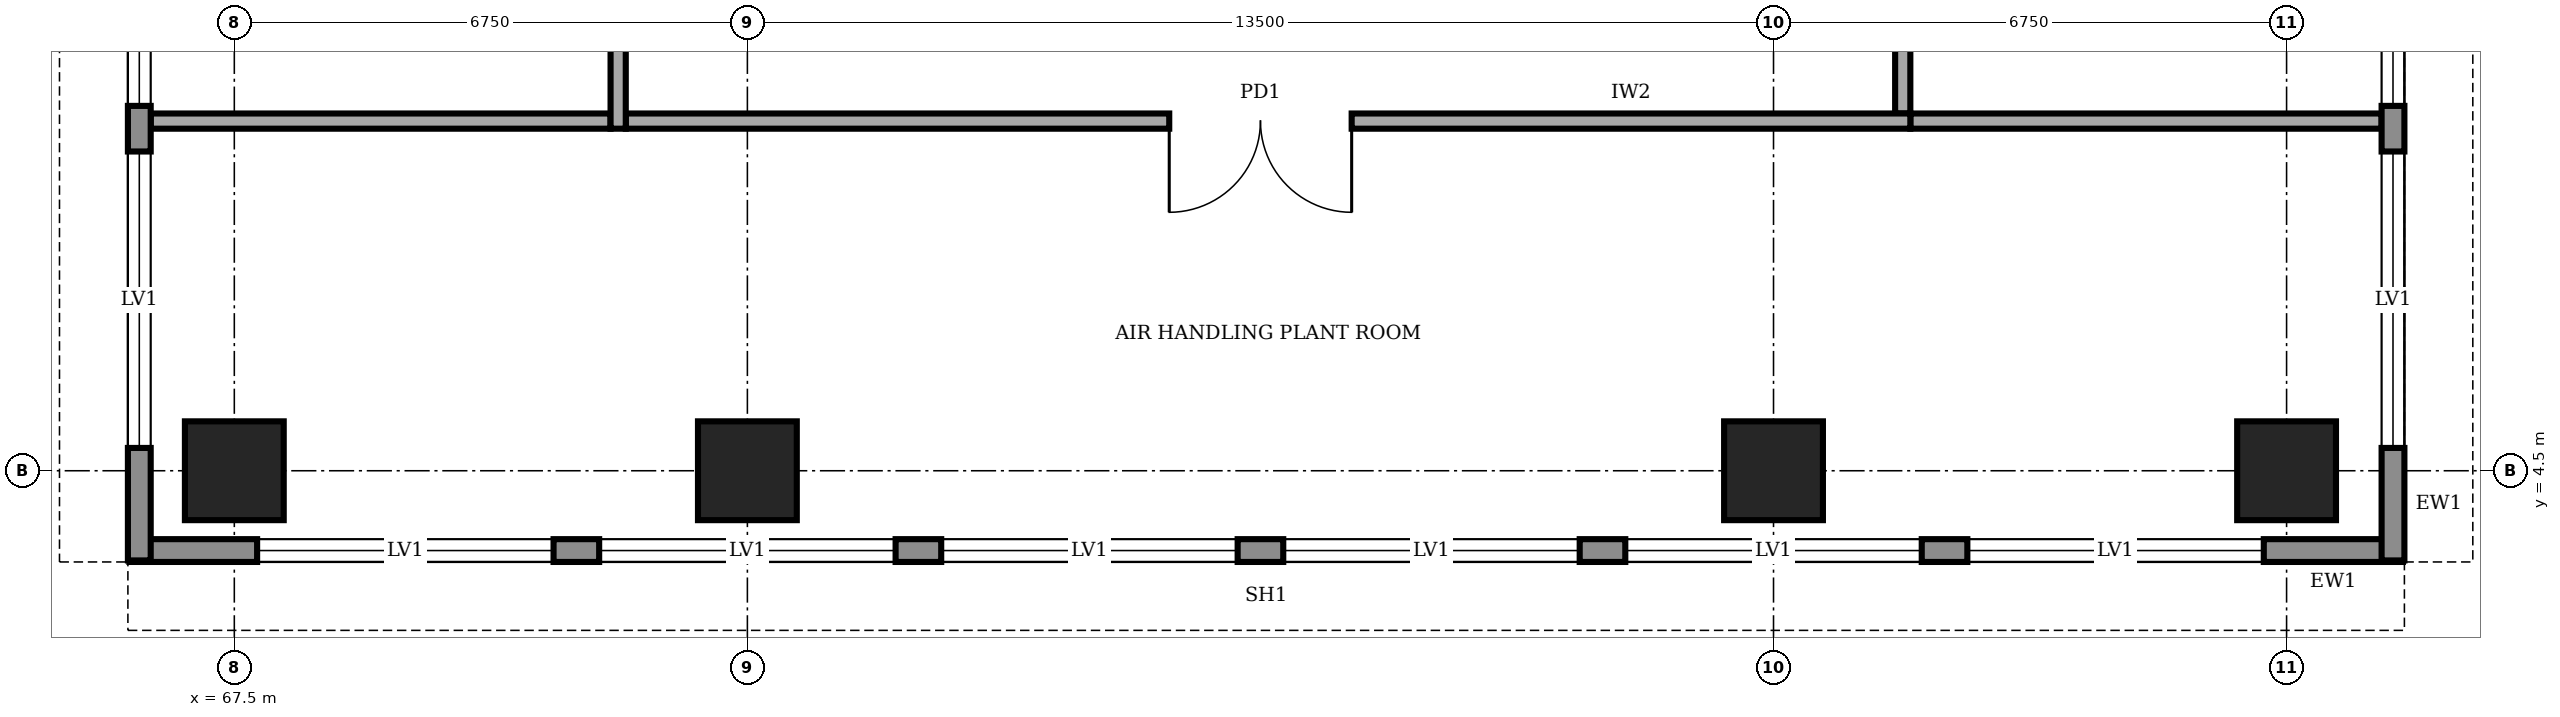
"""IFC4 building model, lengths in metres.
Left out: names, types, materials, properties, quantities, classifications, styles, units other than length and angle.
Written with IfcOpenShell. Run it as: python <this file> out.ifc"""

import sys

from ifc_helpers import new_model, si_unit, direction, frame, frame_2d, origin, origin_2d, place, context, subcontext, project, spatial, rectangle, extrude, element, fill, save


model = new_model("IFC4")
c1 = context("Model", 3, precision=1e-05, world=origin(), true_north=direction((0.0, 1.0)))
c2 = subcontext(c1, "Body", "Model", "MODEL_VIEW")
j1 = project(units=[si_unit("LENGTHUNIT", "METRE"), si_unit("PLANEANGLEUNIT", "RADIAN")], contexts=[c1])
p1 = place(None, origin())
s1 = spatial("IfcSite", under=j1, at=p1, CompositionType="ELEMENT")
p2 = place(p1, origin())
s2 = spatial("IfcBuilding", under=s1, at=p2, CompositionType="ELEMENT")
p3 = place(p2, frame((0.0, 0.0, 229.0)))
s3 = spatial("IfcBuildingStorey", under=s2, at=p3, CompositionType="ELEMENT", Elevation=229.0)
for number, where, z_axis, x_axis in (
    (1, (67.5, 4.5, 0.0), (0.0, 0.0, 1.0), (1.0, 0.0, 0.0)),
    (2, (74.25, 4.5, 0.0), (0.0, 0.0, 1.0), (1.0, 0.0, 0.0)),
    (3, (87.75, 4.5, 0.0), (0.0, 0.0, 1.0), (1.0, 0.0, 0.0)),
    (4, (94.5, 4.5, 0.0), (0.0, 0.0, 1.0), (1.0, 0.0, 0.0)),
):
    element("IfcColumn", number, at=place(p3, frame(where, z_axis=z_axis, x_axis=x_axis)), inside=s3, PredefinedType="COLUMN", context=c2, shape_type="SweptSolid", body=[
        extrude(rectangle(XDim=1.3, YDim=1.3, at=origin_2d()), origin(), (0.0, 0.0, 1.0), 4.0),
    ])
p4 = place(p3, frame((66.12, 3.45, 0.0), z_axis=(0.0, 0.0, 1.0), x_axis=(1.0, 0.0, 0.0)))
e5 = element("IfcWall", 5, at=p4, inside=s3, PredefinedType="STANDARD", context=c2, shape_type="SweptSolid", body=[
    extrude(rectangle(XDim=29.91, YDim=0.3, at=frame_2d((14.955, 0.0))), origin(), (0.0, 0.0, 1.0), 3.75),
])
p5 = place(p4, frame((1.68, 0.0, 0.9)))
e6 = element("IfcOpeningElement", 6, at=p5, cuts=e5, PredefinedType="OPENING", context=c2, shape_type="SweptSolid", body=[
    extrude(rectangle(XDim=3.9, YDim=2.2, at=frame_2d((1.95, 1.1))), frame((0.0, 0.16, 0.0), z_axis=(0.0, -1.0, 0.0), x_axis=(1.0, 0.0, 0.0)), (0.0, 0.0, 1.0), 0.32),
])
p6 = place(p4, frame((6.18, 0.0, 0.9)))
e7 = element("IfcOpeningElement", 7, at=p6, cuts=e5, PredefinedType="OPENING", context=c2, shape_type="SweptSolid", body=[
    extrude(rectangle(XDim=3.9, YDim=2.2, at=frame_2d((1.95, 1.1))), frame((0.0, 0.16, 0.0), z_axis=(0.0, -1.0, 0.0), x_axis=(1.0, 0.0, 0.0)), (0.0, 0.0, 1.0), 0.32),
])
p7 = place(p4, frame((10.68, 0.0, 0.9)))
e8 = element("IfcOpeningElement", 8, at=p7, cuts=e5, PredefinedType="OPENING", context=c2, shape_type="SweptSolid", body=[
    extrude(rectangle(XDim=3.9, YDim=2.2, at=frame_2d((1.95, 1.1))), frame((0.0, 0.16, 0.0), z_axis=(0.0, -1.0, 0.0), x_axis=(1.0, 0.0, 0.0)), (0.0, 0.0, 1.0), 0.32),
])
p8 = place(p4, frame((15.18, 0.0, 0.9)))
e9 = element("IfcOpeningElement", 9, at=p8, cuts=e5, PredefinedType="OPENING", context=c2, shape_type="SweptSolid", body=[
    extrude(rectangle(XDim=3.9, YDim=2.2, at=frame_2d((1.95, 1.1))), frame((0.0, 0.16, 0.0), z_axis=(0.0, -1.0, 0.0), x_axis=(1.0, 0.0, 0.0)), (0.0, 0.0, 1.0), 0.32),
])
p9 = place(p4, frame((19.68, 0.0, 0.9)))
e10 = element("IfcOpeningElement", 10, at=p9, cuts=e5, PredefinedType="OPENING", context=c2, shape_type="SweptSolid", body=[
    extrude(rectangle(XDim=3.9, YDim=2.2, at=frame_2d((1.95, 1.1))), frame((0.0, 0.16, 0.0), z_axis=(0.0, -1.0, 0.0), x_axis=(1.0, 0.0, 0.0)), (0.0, 0.0, 1.0), 0.32),
])
p10 = place(p4, frame((24.18, 0.0, 0.9)))
e11 = element("IfcOpeningElement", 11, at=p10, cuts=e5, PredefinedType="OPENING", context=c2, shape_type="SweptSolid", body=[
    extrude(rectangle(XDim=3.9, YDim=2.2, at=frame_2d((1.95, 1.1))), frame((0.0, 0.16, 0.0), z_axis=(0.0, -1.0, 0.0), x_axis=(1.0, 0.0, 0.0)), (0.0, 0.0, 1.0), 0.32),
])
p11 = place(p3, frame((95.9, 3.32, 0.0), z_axis=(0.0, 0.0, 1.0), x_axis=(0.0, 1.0, 0.0)))
e12 = element("IfcWall", 12, at=p11, inside=s3, PredefinedType="STANDARD", context=c2, shape_type="SweptSolid", body=[
    extrude(rectangle(XDim=33.86, YDim=0.3, at=frame_2d((16.93, 0.0))), origin(), (0.0, 0.0, 1.0), 3.75),
])
p12 = place(p11, frame((1.48, 0.0, 0.9)))
e13 = element("IfcOpeningElement", 13, at=p12, cuts=e12, PredefinedType="OPENING", context=c2, shape_type="SweptSolid", body=[
    extrude(rectangle(XDim=3.9, YDim=2.2, at=frame_2d((1.95, 1.1))), frame((0.0, 0.16, 0.0), z_axis=(0.0, -1.0, 0.0), x_axis=(1.0, 0.0, 0.0)), (0.0, 0.0, 1.0), 0.32),
])
p13 = place(p11, frame((5.98, 0.0, 0.9)))
e14 = element("IfcOpeningElement", 14, at=p13, cuts=e12, PredefinedType="OPENING", context=c2, shape_type="SweptSolid", body=[
    extrude(rectangle(XDim=3.9, YDim=2.2, at=frame_2d((1.95, 1.1))), frame((0.0, 0.16, 0.0), z_axis=(0.0, -1.0, 0.0), x_axis=(1.0, 0.0, 0.0)), (0.0, 0.0, 1.0), 0.32),
])
p14 = place(p11, frame((10.48, 0.0, 0.9)))
e15 = element("IfcOpeningElement", 15, at=p14, cuts=e12, PredefinedType="OPENING", context=c2, shape_type="SweptSolid", body=[
    extrude(rectangle(XDim=3.9, YDim=2.2, at=frame_2d((1.95, 1.1))), frame((0.0, 0.16, 0.0), z_axis=(0.0, -1.0, 0.0), x_axis=(1.0, 0.0, 0.0)), (0.0, 0.0, 1.0), 0.32),
])
p15 = place(p11, frame((14.98, 0.0, 0.9)))
e16 = element("IfcOpeningElement", 16, at=p15, cuts=e12, PredefinedType="OPENING", context=c2, shape_type="SweptSolid", body=[
    extrude(rectangle(XDim=3.9, YDim=2.2, at=frame_2d((1.95, 1.1))), frame((0.0, 0.16, 0.0), z_axis=(0.0, -1.0, 0.0), x_axis=(1.0, 0.0, 0.0)), (0.0, 0.0, 1.0), 0.32),
])
p16 = place(p11, frame((19.48, 0.0, 0.9)))
e17 = element("IfcOpeningElement", 17, at=p16, cuts=e12, PredefinedType="OPENING", context=c2, shape_type="SweptSolid", body=[
    extrude(rectangle(XDim=3.9, YDim=2.2, at=frame_2d((1.95, 1.1))), frame((0.0, 0.16, 0.0), z_axis=(0.0, -1.0, 0.0), x_axis=(1.0, 0.0, 0.0)), (0.0, 0.0, 1.0), 0.32),
])
p17 = place(p11, frame((23.98, 0.0, 0.9)))
e18 = element("IfcOpeningElement", 18, at=p17, cuts=e12, PredefinedType="OPENING", context=c2, shape_type="SweptSolid", body=[
    extrude(rectangle(XDim=3.9, YDim=2.2, at=frame_2d((1.95, 1.1))), frame((0.0, 0.16, 0.0), z_axis=(0.0, -1.0, 0.0), x_axis=(1.0, 0.0, 0.0)), (0.0, 0.0, 1.0), 0.32),
])
p18 = place(p11, frame((28.48, 0.0, 0.9)))
e19 = element("IfcOpeningElement", 19, at=p18, cuts=e12, PredefinedType="OPENING", context=c2, shape_type="SweptSolid", body=[
    extrude(rectangle(XDim=3.9, YDim=2.2, at=frame_2d((1.95, 1.1))), frame((0.0, 0.16, 0.0), z_axis=(0.0, -1.0, 0.0), x_axis=(1.0, 0.0, 0.0)), (0.0, 0.0, 1.0), 0.32),
])
p19 = place(p3, frame((66.25, 37.18, 0.0), z_axis=(0.0, 0.0, 1.0), x_axis=(0.0, -1.0, 0.0)))
e20 = element("IfcWall", 20, at=p19, inside=s3, PredefinedType="STANDARD", context=c2, shape_type="SweptSolid", body=[
    extrude(rectangle(XDim=33.86, YDim=0.3, at=frame_2d((16.93, 0.0))), origin(), (0.0, 0.0, 1.0), 3.75),
])
p20 = place(p19, frame((28.48, 0.0, 0.9)))
e21 = element("IfcOpeningElement", 21, at=p20, cuts=e20, PredefinedType="OPENING", context=c2, shape_type="SweptSolid", body=[
    extrude(rectangle(XDim=3.9, YDim=2.2, at=frame_2d((1.95, 1.1))), frame((0.0, 0.16, 0.0), z_axis=(0.0, -1.0, 0.0), x_axis=(1.0, 0.0, 0.0)), (0.0, 0.0, 1.0), 0.32),
])
p21 = place(p19, frame((23.98, 0.0, 0.9)))
e22 = element("IfcOpeningElement", 22, at=p21, cuts=e20, PredefinedType="OPENING", context=c2, shape_type="SweptSolid", body=[
    extrude(rectangle(XDim=3.9, YDim=2.2, at=frame_2d((1.95, 1.1))), frame((0.0, 0.16, 0.0), z_axis=(0.0, -1.0, 0.0), x_axis=(1.0, 0.0, 0.0)), (0.0, 0.0, 1.0), 0.32),
])
p22 = place(p19, frame((19.48, 0.0, 0.9)))
e23 = element("IfcOpeningElement", 23, at=p22, cuts=e20, PredefinedType="OPENING", context=c2, shape_type="SweptSolid", body=[
    extrude(rectangle(XDim=3.9, YDim=2.2, at=frame_2d((1.95, 1.1))), frame((0.0, 0.16, 0.0), z_axis=(0.0, -1.0, 0.0), x_axis=(1.0, 0.0, 0.0)), (0.0, 0.0, 1.0), 0.32),
])
p23 = place(p19, frame((14.98, 0.0, 0.9)))
e24 = element("IfcOpeningElement", 24, at=p23, cuts=e20, PredefinedType="OPENING", context=c2, shape_type="SweptSolid", body=[
    extrude(rectangle(XDim=3.9, YDim=2.2, at=frame_2d((1.95, 1.1))), frame((0.0, 0.16, 0.0), z_axis=(0.0, -1.0, 0.0), x_axis=(1.0, 0.0, 0.0)), (0.0, 0.0, 1.0), 0.32),
])
p24 = place(p19, frame((10.48, 0.0, 0.9)))
e25 = element("IfcOpeningElement", 25, at=p24, cuts=e20, PredefinedType="OPENING", context=c2, shape_type="SweptSolid", body=[
    extrude(rectangle(XDim=3.9, YDim=2.2, at=frame_2d((1.95, 1.1))), frame((0.0, 0.16, 0.0), z_axis=(0.0, -1.0, 0.0), x_axis=(1.0, 0.0, 0.0)), (0.0, 0.0, 1.0), 0.32),
])
p25 = place(p19, frame((5.98, 0.0, 0.9)))
e26 = element("IfcOpeningElement", 26, at=p25, cuts=e20, PredefinedType="OPENING", context=c2, shape_type="SweptSolid", body=[
    extrude(rectangle(XDim=3.9, YDim=2.2, at=frame_2d((1.95, 1.1))), frame((0.0, 0.16, 0.0), z_axis=(0.0, -1.0, 0.0), x_axis=(1.0, 0.0, 0.0)), (0.0, 0.0, 1.0), 0.32),
])
p26 = place(p19, frame((1.48, 0.0, 0.9)))
e27 = element("IfcOpeningElement", 27, at=p26, cuts=e20, PredefinedType="OPENING", context=c2, shape_type="SweptSolid", body=[
    extrude(rectangle(XDim=3.9, YDim=2.2, at=frame_2d((1.95, 1.1))), frame((0.0, 0.16, 0.0), z_axis=(0.0, -1.0, 0.0), x_axis=(1.0, 0.0, 0.0)), (0.0, 0.0, 1.0), 0.32),
])
p27 = place(p3, frame((72.65, 9.1, 0.0), z_axis=(0.0, 0.0, 1.0), x_axis=(1.0, 0.0, 0.0)))
e28 = element("IfcWall", 28, at=p27, inside=s3, PredefinedType="SOLIDWALL", context=c2, shape_type="SweptSolid", body=[
    extrude(rectangle(XDim=16.9, YDim=0.2, at=frame_2d((8.45, 0.0))), origin(), (0.0, 0.0, 1.0), 3.75),
])
p28 = place(p27, frame((7.15, 0.0, 0.0)))
e29 = element("IfcOpeningElement", 29, at=p28, cuts=e28, PredefinedType="OPENING", context=c2, shape_type="SweptSolid", body=[
    extrude(rectangle(XDim=2.4, YDim=2.7, at=frame_2d((1.2, 1.35))), frame((0.0, 0.11, 0.0), z_axis=(0.0, -1.0, 0.0), x_axis=(1.0, 0.0, 0.0)), (0.0, 0.0, 1.0), 0.22),
])
p29 = place(p3, frame((89.45, 9.2, 0.0), z_axis=(0.0, 0.0, 1.0), x_axis=(0.0, 1.0, 0.0)))
e30 = element("IfcWall", 30, at=p29, inside=s3, PredefinedType="SOLIDWALL", context=c2, shape_type="SweptSolid", body=[
    extrude(rectangle(XDim=22.3, YDim=0.2, at=frame_2d((11.15, 0.0))), origin(), (0.0, 0.0, 1.0), 3.75),
])
p30 = place(p29, frame((1.55, 0.0, 0.0)))
e31 = element("IfcOpeningElement", 31, at=p30, cuts=e30, PredefinedType="OPENING", context=c2, shape_type="SweptSolid", body=[
    extrude(rectangle(XDim=1.0, YDim=2.1, at=frame_2d((0.5, 1.05))), frame((0.0, 0.11, 0.0), z_axis=(0.0, -1.0, 0.0), x_axis=(1.0, 0.0, 0.0)), (0.0, 0.0, 1.0), 0.22),
])
p31 = place(p29, frame((5.75, 0.0, 0.0)))
e32 = element("IfcOpeningElement", 32, at=p31, cuts=e30, PredefinedType="OPENING", context=c2, shape_type="SweptSolid", body=[
    extrude(rectangle(XDim=0.9, YDim=2.1, at=frame_2d((0.45, 1.05))), frame((0.0, 0.11, 0.0), z_axis=(0.0, -1.0, 0.0), x_axis=(1.0, 0.0, 0.0)), (0.0, 0.0, 1.0), 0.22),
])
p32 = place(p29, frame((8.75, 0.0, 0.0)))
e33 = element("IfcOpeningElement", 33, at=p32, cuts=e30, PredefinedType="OPENING", context=c2, shape_type="SweptSolid", body=[
    extrude(rectangle(XDim=0.9, YDim=2.1, at=frame_2d((0.45, 1.05))), frame((0.0, 0.11, 0.0), z_axis=(0.0, -1.0, 0.0), x_axis=(1.0, 0.0, 0.0)), (0.0, 0.0, 1.0), 0.22),
])
p33 = place(p29, frame((13.6, 0.0, 0.0)))
e34 = element("IfcOpeningElement", 34, at=p33, cuts=e30, PredefinedType="OPENING", context=c2, shape_type="SweptSolid", body=[
    extrude(rectangle(XDim=0.9, YDim=2.1, at=frame_2d((0.45, 1.05))), frame((0.0, 0.11, 0.0), z_axis=(0.0, -1.0, 0.0), x_axis=(1.0, 0.0, 0.0)), (0.0, 0.0, 1.0), 0.22),
])
p34 = place(p29, frame((16.3, 0.0, 0.0)))
e35 = element("IfcOpeningElement", 35, at=p34, cuts=e30, PredefinedType="OPENING", context=c2, shape_type="SweptSolid", body=[
    extrude(rectangle(XDim=1.0, YDim=2.1, at=frame_2d((0.5, 1.05))), frame((0.0, 0.11, 0.0), z_axis=(0.0, -1.0, 0.0), x_axis=(1.0, 0.0, 0.0)), (0.0, 0.0, 1.0), 0.22),
])
p35 = place(p29, frame((10.8, 0.0, 0.0)))
e36 = element("IfcOpeningElement", 36, at=p35, cuts=e30, PredefinedType="OPENING", context=c2, shape_type="SweptSolid", body=[
    extrude(rectangle(XDim=1.0, YDim=2.1, at=frame_2d((0.5, 1.05))), frame((0.0, 0.11, 0.0), z_axis=(0.0, -1.0, 0.0), x_axis=(1.0, 0.0, 0.0)), (0.0, 0.0, 1.0), 0.22),
])
p36 = place(p29, frame((19.55, 0.0, 0.0)))
e37 = element("IfcOpeningElement", 37, at=p36, cuts=e30, PredefinedType="OPENING", context=c2, shape_type="SweptSolid", body=[
    extrude(rectangle(XDim=1.0, YDim=2.1, at=frame_2d((0.5, 1.05))), frame((0.0, 0.11, 0.0), z_axis=(0.0, -1.0, 0.0), x_axis=(1.0, 0.0, 0.0)), (0.0, 0.0, 1.0), 0.22),
])
p37 = place(p3, frame((72.55, 31.3, 0.0), z_axis=(0.0, 0.0, 1.0), x_axis=(0.0, -1.0, 0.0)))
e38 = element("IfcWall", 38, at=p37, inside=s3, PredefinedType="SOLIDWALL", context=c2, shape_type="SweptSolid", body=[
    extrude(rectangle(XDim=22.3, YDim=0.2, at=frame_2d((11.15, 0.0))), origin(), (0.0, 0.0, 1.0), 3.75),
])
p38 = place(p37, frame((10.05, 0.0, 0.0)))
e39 = element("IfcOpeningElement", 39, at=p38, cuts=e38, PredefinedType="OPENING", context=c2, shape_type="SweptSolid", body=[
    extrude(rectangle(XDim=2.0, YDim=2.1, at=frame_2d((1.0, 1.05))), frame((0.0, 0.11, 0.0), z_axis=(0.0, -1.0, 0.0), x_axis=(1.0, 0.0, 0.0)), (0.0, 0.0, 1.0), 0.22),
])
p39 = place(p3, frame((66.4, 9.1, 0.0), z_axis=(0.0, 0.0, 1.0), x_axis=(1.0, 0.0, 0.0)))
e40 = element("IfcWall", 40, at=p39, inside=s3, PredefinedType="SOLIDWALL", context=c2, shape_type="SweptSolid", body=[
    extrude(rectangle(XDim=6.05, YDim=0.2, at=frame_2d((3.025, 0.0))), origin(), (0.0, 0.0, 1.0), 3.75),
])
p40 = place(p3, frame((89.55, 9.1, 0.0), z_axis=(0.0, 0.0, 1.0), x_axis=(1.0, 0.0, 0.0)))
e41 = element("IfcWall", 41, at=p40, inside=s3, PredefinedType="SOLIDWALL", context=c2, shape_type="SweptSolid", body=[
    extrude(rectangle(XDim=6.2, YDim=0.2, at=frame_2d((3.1, 0.0))), origin(), (0.0, 0.0, 1.0), 3.75),
])
p41 = place(p5, origin())
e42 = element("IfcWindow", 42, at=p41, inside=s3, PartitioningType="SINGLE_PANEL", PredefinedType="WINDOW", context=c2, shape_type="SweptSolid", body=[
    extrude(rectangle(XDim=3.9, YDim=2.2, at=frame_2d((1.95, 1.1))), frame((0.0, 0.03, 0.0), z_axis=(0.0, -1.0, 0.0), x_axis=(1.0, 0.0, 0.0)), (0.0, 0.0, 1.0), 0.06),
])
fill(e6, e42)
p42 = place(p6, origin())
e43 = element("IfcWindow", 43, at=p42, inside=s3, PartitioningType="SINGLE_PANEL", PredefinedType="WINDOW", context=c2, shape_type="SweptSolid", body=[
    extrude(rectangle(XDim=3.9, YDim=2.2, at=frame_2d((1.95, 1.1))), frame((0.0, 0.03, 0.0), z_axis=(0.0, -1.0, 0.0), x_axis=(1.0, 0.0, 0.0)), (0.0, 0.0, 1.0), 0.06),
])
fill(e7, e43)
p43 = place(p7, origin())
e44 = element("IfcWindow", 44, at=p43, inside=s3, PartitioningType="SINGLE_PANEL", PredefinedType="WINDOW", context=c2, shape_type="SweptSolid", body=[
    extrude(rectangle(XDim=3.9, YDim=2.2, at=frame_2d((1.95, 1.1))), frame((0.0, 0.03, 0.0), z_axis=(0.0, -1.0, 0.0), x_axis=(1.0, 0.0, 0.0)), (0.0, 0.0, 1.0), 0.06),
])
fill(e8, e44)
p44 = place(p8, origin())
e45 = element("IfcWindow", 45, at=p44, inside=s3, PartitioningType="SINGLE_PANEL", PredefinedType="WINDOW", context=c2, shape_type="SweptSolid", body=[
    extrude(rectangle(XDim=3.9, YDim=2.2, at=frame_2d((1.95, 1.1))), frame((0.0, 0.03, 0.0), z_axis=(0.0, -1.0, 0.0), x_axis=(1.0, 0.0, 0.0)), (0.0, 0.0, 1.0), 0.06),
])
fill(e9, e45)
p45 = place(p9, origin())
e46 = element("IfcWindow", 46, at=p45, inside=s3, PartitioningType="SINGLE_PANEL", PredefinedType="WINDOW", context=c2, shape_type="SweptSolid", body=[
    extrude(rectangle(XDim=3.9, YDim=2.2, at=frame_2d((1.95, 1.1))), frame((0.0, 0.03, 0.0), z_axis=(0.0, -1.0, 0.0), x_axis=(1.0, 0.0, 0.0)), (0.0, 0.0, 1.0), 0.06),
])
fill(e10, e46)
p46 = place(p10, origin())
e47 = element("IfcWindow", 47, at=p46, inside=s3, PartitioningType="SINGLE_PANEL", PredefinedType="WINDOW", context=c2, shape_type="SweptSolid", body=[
    extrude(rectangle(XDim=3.9, YDim=2.2, at=frame_2d((1.95, 1.1))), frame((0.0, 0.03, 0.0), z_axis=(0.0, -1.0, 0.0), x_axis=(1.0, 0.0, 0.0)), (0.0, 0.0, 1.0), 0.06),
])
fill(e11, e47)
p47 = place(p12, origin())
e48 = element("IfcWindow", 48, at=p47, inside=s3, PartitioningType="SINGLE_PANEL", PredefinedType="WINDOW", context=c2, shape_type="SweptSolid", body=[
    extrude(rectangle(XDim=3.9, YDim=2.2, at=frame_2d((1.95, 1.1))), frame((0.0, 0.03, 0.0), z_axis=(0.0, -1.0, 0.0), x_axis=(1.0, 0.0, 0.0)), (0.0, 0.0, 1.0), 0.06),
])
fill(e13, e48)
p48 = place(p13, origin())
e49 = element("IfcWindow", 49, at=p48, inside=s3, PartitioningType="SINGLE_PANEL", PredefinedType="WINDOW", context=c2, shape_type="SweptSolid", body=[
    extrude(rectangle(XDim=3.9, YDim=2.2, at=frame_2d((1.95, 1.1))), frame((0.0, 0.03, 0.0), z_axis=(0.0, -1.0, 0.0), x_axis=(1.0, 0.0, 0.0)), (0.0, 0.0, 1.0), 0.06),
])
fill(e14, e49)
p49 = place(p20, origin())
e50 = element("IfcWindow", 50, at=p49, inside=s3, PartitioningType="SINGLE_PANEL", PredefinedType="WINDOW", context=c2, shape_type="SweptSolid", body=[
    extrude(rectangle(XDim=3.9, YDim=2.2, at=frame_2d((1.95, 1.1))), frame((0.0, 0.03, 0.0), z_axis=(0.0, -1.0, 0.0), x_axis=(1.0, 0.0, 0.0)), (0.0, 0.0, 1.0), 0.06),
])
fill(e21, e50)
p50 = place(p21, origin())
e51 = element("IfcWindow", 51, at=p50, inside=s3, PartitioningType="SINGLE_PANEL", PredefinedType="WINDOW", context=c2, shape_type="SweptSolid", body=[
    extrude(rectangle(XDim=3.9, YDim=2.2, at=frame_2d((1.95, 1.1))), frame((0.0, 0.03, 0.0), z_axis=(0.0, -1.0, 0.0), x_axis=(1.0, 0.0, 0.0)), (0.0, 0.0, 1.0), 0.06),
])
fill(e22, e51)
p51 = place(p28, frame((2.4, 0.0, 0.0), z_axis=(0.0, 0.0, 1.0), x_axis=(-1.0, 0.0, 0.0)))
e52 = element("IfcDoor", 52, at=p51, inside=s3, OperationType="DOUBLE_DOOR_SINGLE_SWING", PredefinedType="DOOR", context=c2, shape_type="SweptSolid", body=[
    extrude(rectangle(XDim=2.4, YDim=2.7, at=frame_2d((1.2, 1.35))), frame((0.0, 0.025, 0.0), z_axis=(0.0, -1.0, 0.0), x_axis=(1.0, 0.0, 0.0)), (0.0, 0.0, 1.0), 0.05),
])
fill(e29, e52)
save(model, sys.argv[1])
